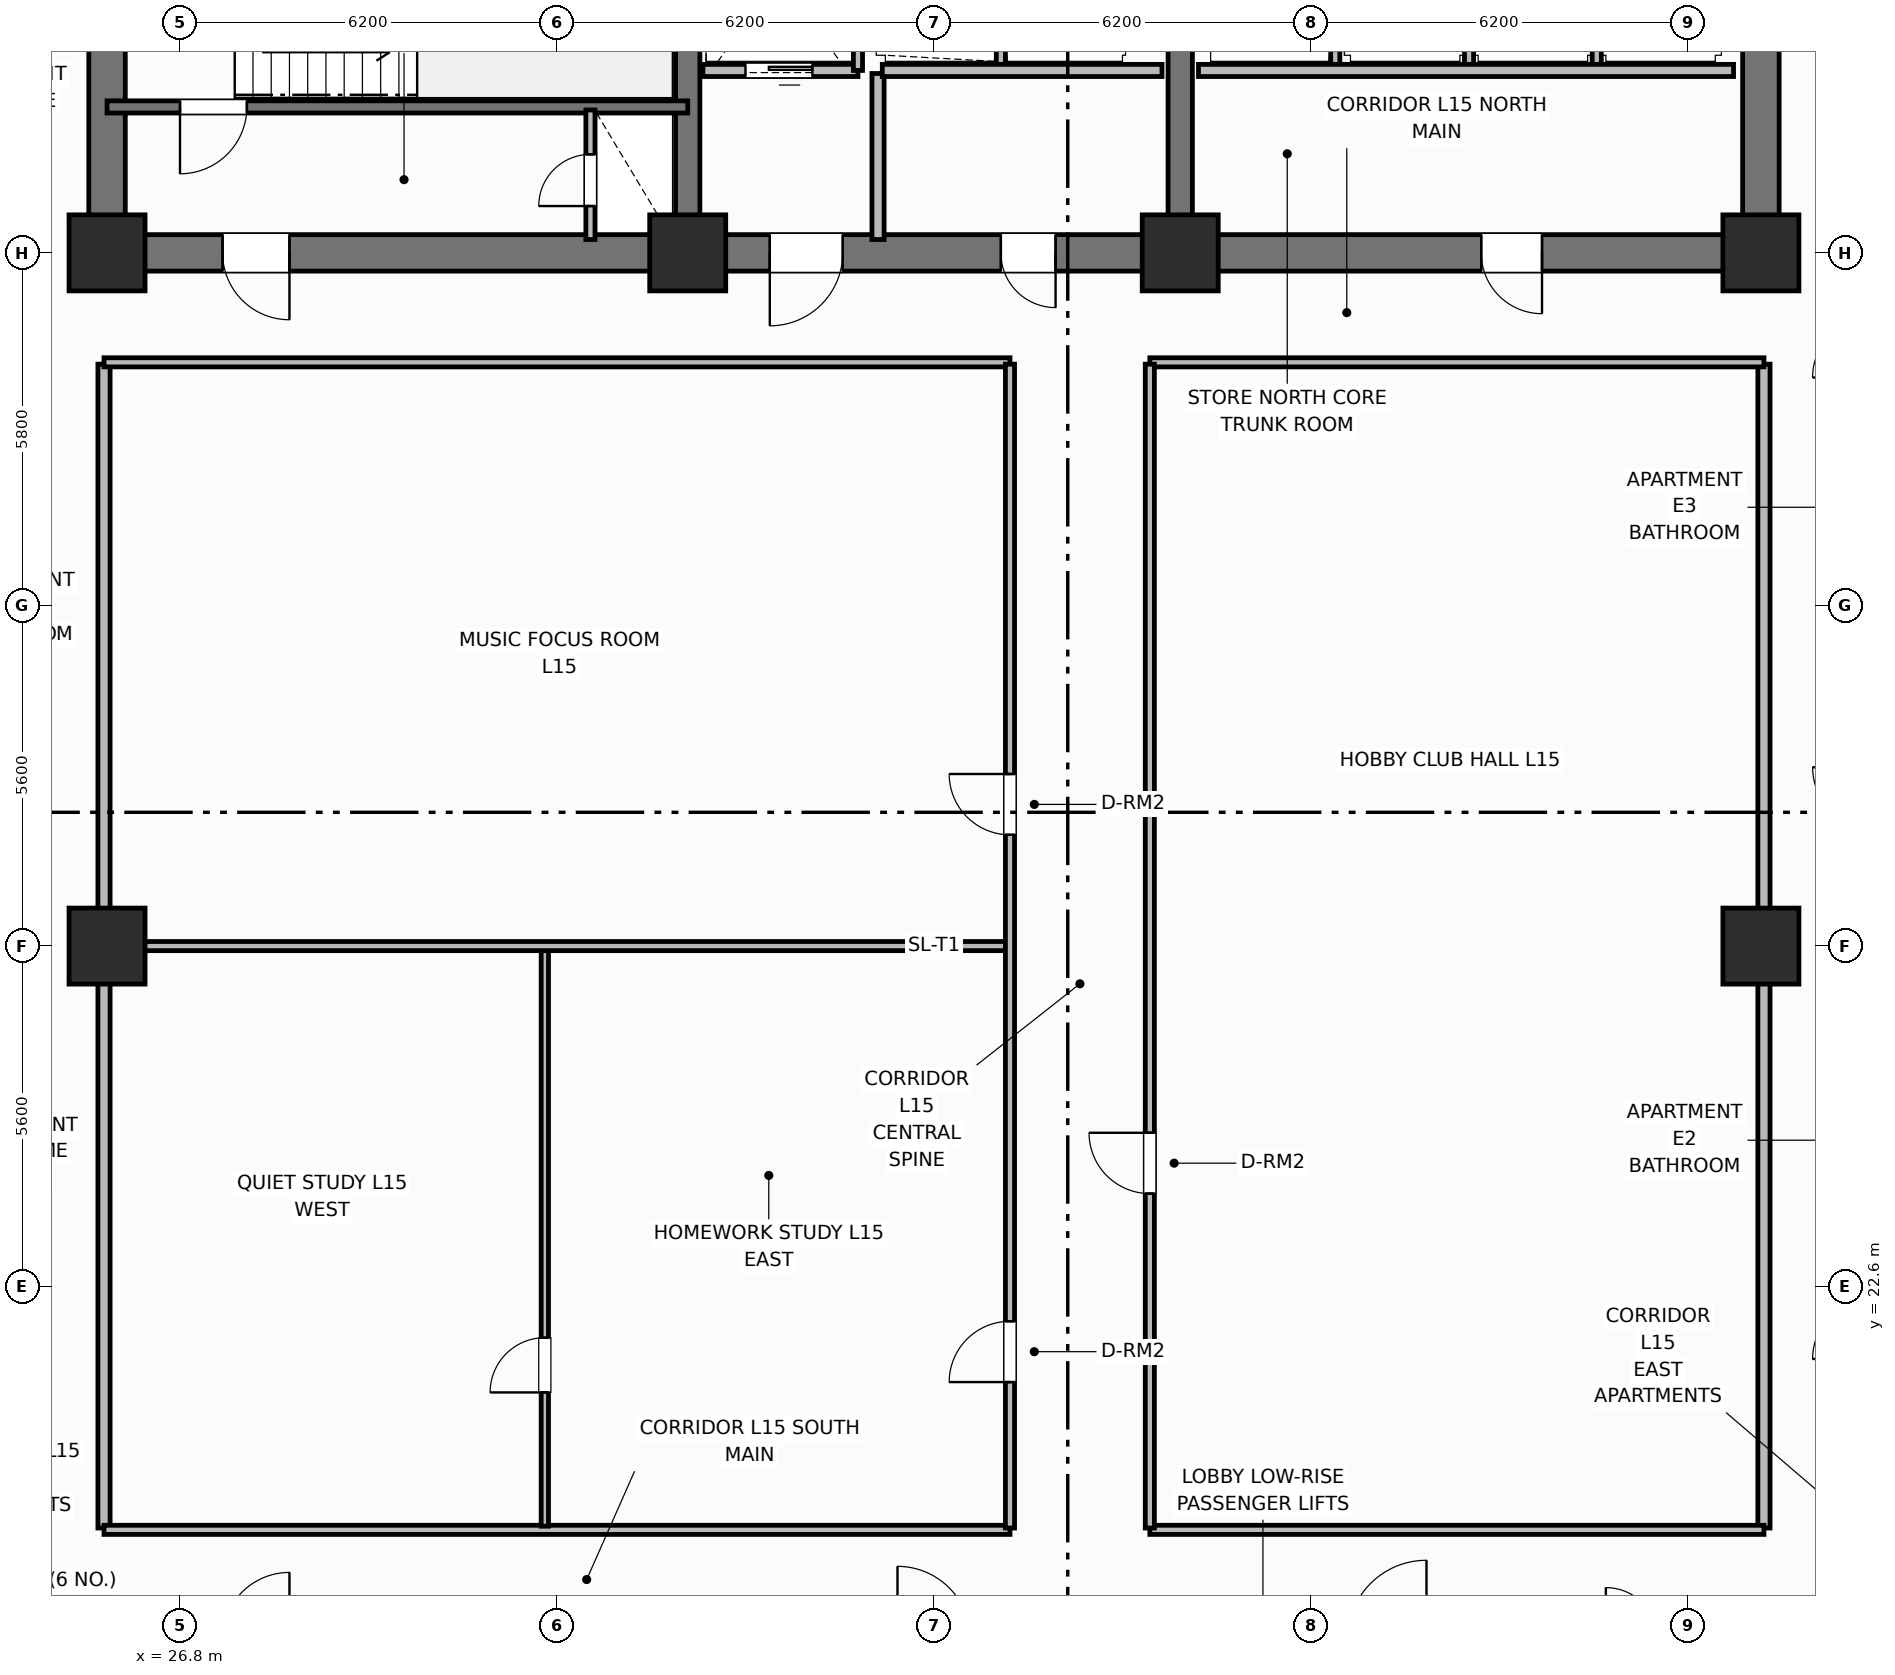
"""IFC4 building model, lengths in metres.
Left out: names, types, materials, properties, quantities, classifications, styles, units other than length and angle.
Written with IfcOpenShell. Run it as: python <this file> out.ifc"""

import sys

from ifc_helpers import new_model, si_unit, direction, frame, frame_2d, origin, origin_2d, place, context, subcontext, project, spatial, rectangle, extrude, element, fill, save


model = new_model("IFC4")
c1 = context("Model", 3, precision=1e-05, world=origin(), true_north=direction((0.0, 1.0)))
c2 = subcontext(c1, "Body", "Model", "MODEL_VIEW")
j1 = project(units=[si_unit("LENGTHUNIT", "METRE"), si_unit("PLANEANGLEUNIT", "RADIAN")], contexts=[c1])
p1 = place(None, origin())
s1 = spatial("IfcSite", under=j1, at=p1, CompositionType="ELEMENT")
p2 = place(p1, origin())
s2 = spatial("IfcBuilding", under=s1, at=p2, CompositionType="ELEMENT")
p3 = place(p2, frame((0.0, 0.0, 62.1)))
s3 = spatial("IfcBuildingStorey", under=s2, at=p3, CompositionType="ELEMENT", Elevation=62.1)
for number, where, z_axis, x_axis in (
    (1, (25.6, 39.9, 0.0), (0.0, 0.0, 1.0), (0.0, 1.0, 0.0)),
    (2, (52.8, 39.9, 0.0), (0.0, 0.0, 1.0), (0.0, 1.0, 0.0)),
):
    element("IfcWall", number, at=place(p3, frame(where, z_axis=z_axis, x_axis=x_axis)), inside=s3, PredefinedType="SHEAR", context=c2, shape_type="SweptSolid", body=[
        extrude(rectangle(XDim=5.6, YDim=0.6, at=frame_2d((2.8, 0.0))), origin(), (0.0, 0.0, 1.0), 3.7),
    ])
p4 = place(p3, frame((52.8, 39.6, 0.0), z_axis=(0.0, 0.0, 1.0), x_axis=(-1.0, 0.0, 0.0)))
e3 = element("IfcWall", 3, at=p4, inside=s3, PredefinedType="SHEAR", context=c2, shape_type="SweptSolid", body=[
    extrude(rectangle(XDim=27.2, YDim=0.6, at=frame_2d((13.6, 0.0))), origin(), (0.0, 0.0, 1.0), 3.7),
])
p5 = place(p4, frame((24.2, 0.0, 0.0)))
e4 = element("IfcOpeningElement", 4, at=p5, cuts=e3, PredefinedType="OPENING", context=c2, shape_type="SweptSolid", body=[
    extrude(rectangle(XDim=1.1, YDim=2.15, at=frame_2d((0.55, 1.075))), frame((0.0, 0.31, 0.0), z_axis=(0.0, -1.0, 0.0), x_axis=(1.0, 0.0, 0.0)), (0.0, 0.0, 1.0), 0.62),
])
p6 = place(p4, frame((15.1, 0.0, 0.0)))
e5 = element("IfcOpeningElement", 5, at=p6, cuts=e3, PredefinedType="OPENING", context=c2, shape_type="SweptSolid", body=[
    extrude(rectangle(XDim=1.2, YDim=2.15, at=frame_2d((0.6, 1.075))), frame((0.0, 0.31, 0.0), z_axis=(0.0, -1.0, 0.0), x_axis=(1.0, 0.0, 0.0)), (0.0, 0.0, 1.0), 0.62),
])
p7 = place(p4, frame((11.6, 0.0, 0.0)))
e6 = element("IfcOpeningElement", 6, at=p7, cuts=e3, PredefinedType="OPENING", context=c2, shape_type="SweptSolid", body=[
    extrude(rectangle(XDim=0.9, YDim=2.1, at=frame_2d((0.45, 1.05))), frame((0.0, 0.31, 0.0), z_axis=(0.0, -1.0, 0.0), x_axis=(1.0, 0.0, 0.0)), (0.0, 0.0, 1.0), 0.62),
])
p8 = place(p4, frame((3.6, 0.0, 0.0)))
e7 = element("IfcOpeningElement", 7, at=p8, cuts=e3, PredefinedType="OPENING", context=c2, shape_type="SweptSolid", body=[
    extrude(rectangle(XDim=1.0, YDim=2.15, at=frame_2d((0.5, 1.075))), frame((0.0, 0.31, 0.0), z_axis=(0.0, -1.0, 0.0), x_axis=(1.0, 0.0, 0.0)), (0.0, 0.0, 1.0), 0.62),
])
for number, where, z_axis, x_axis in (
    (8, (35.15, 39.9, 0.0), (0.0, 0.0, 1.0), (0.0, 1.0, 0.0)),
    (9, (43.25, 39.9, 0.0), (0.0, 0.0, 1.0), (0.0, 1.0, 0.0)),
):
    element("IfcWall", number, at=place(p3, frame(where, z_axis=z_axis, x_axis=x_axis)), inside=s3, PredefinedType="SHEAR", context=c2, shape_type="SweptSolid", body=[
        extrude(rectangle(XDim=5.6, YDim=0.4, at=frame_2d((2.8, 0.0))), origin(), (0.0, 0.0, 1.0), 3.7),
    ])
for number, where, z_axis, x_axis in (
    (10, (25.6, 39.6, 0.0), (0.0, 0.0, 1.0), (1.0, 0.0, 0.0)),
    (11, (35.15, 39.6, 0.0), (0.0, 0.0, 1.0), (1.0, 0.0, 0.0)),
    (12, (43.25, 39.6, 0.0), (0.0, 0.0, 1.0), (1.0, 0.0, 0.0)),
    (13, (52.8, 39.6, 0.0), (0.0, 0.0, 1.0), (1.0, 0.0, 0.0)),
    (14, (25.6, 28.2, 0.0), (0.0, 0.0, 1.0), (1.0, 0.0, 0.0)),
    (15, (52.8, 28.2, 0.0), (0.0, 0.0, 1.0), (1.0, 0.0, 0.0)),
):
    element("IfcColumn", number, at=place(p3, frame(where, z_axis=z_axis, x_axis=x_axis)), inside=s3, PredefinedType="COLUMN", context=c2, shape_type="SweptSolid", body=[
        extrude(rectangle(XDim=1.25, YDim=1.25, at=origin_2d()), origin(), (0.0, 0.0, 1.0), 3.7),
    ])
p9 = place(p3, frame((35.15, 42.0, 0.0), z_axis=(0.0, 0.0, 1.0), x_axis=(-1.0, 0.0, 0.0)))
e16 = element("IfcWall", 16, at=p9, inside=s3, PredefinedType="SHEAR", context=c2, shape_type="SweptSolid", body=[
    extrude(rectangle(XDim=9.55, YDim=0.2, at=frame_2d((4.775, 0.0))), origin(), (0.0, 0.0, 1.0), 3.7),
])
p10 = place(p9, frame((7.25, 0.0, 0.0)))
e17 = element("IfcOpeningElement", 17, at=p10, cuts=e16, PredefinedType="OPENING", context=c2, shape_type="SweptSolid", body=[
    extrude(rectangle(XDim=1.1, YDim=2.15, at=frame_2d((0.55, 1.075))), frame((0.0, 0.11, 0.0), z_axis=(0.0, -1.0, 0.0), x_axis=(1.0, 0.0, 0.0)), (0.0, 0.0, 1.0), 0.22),
])
p11 = place(p3, frame((33.55, 39.82, 0.0), z_axis=(0.0, 0.0, 1.0), x_axis=(0.0, 1.0, 0.0)))
e18 = element("IfcWall", 18, at=p11, inside=s3, PredefinedType="PARTITIONING", context=c2, shape_type="SweptSolid", body=[
    extrude(rectangle(XDim=2.13, YDim=0.15, at=frame_2d((1.065, 0.0))), origin(), (0.0, 0.0, 1.0), 2.53),
])
p12 = place(p11, frame((0.55, 0.0, 0.0)))
e19 = element("IfcOpeningElement", 19, at=p12, cuts=e18, PredefinedType="OPENING", context=c2, shape_type="SweptSolid", body=[
    extrude(rectangle(XDim=0.85, YDim=2.05, at=frame_2d((0.425, 1.025))), frame((0.0, 0.085, 0.0), z_axis=(0.0, -1.0, 0.0), x_axis=(1.0, 0.0, 0.0)), (0.0, 0.0, 1.0), 0.17),
])
p13 = place(p3, frame((37.95, 42.6, 0.0), z_axis=(0.0, 0.0, 1.0), x_axis=(-1.0, 0.0, 0.0)))
e20 = element("IfcWall", 20, at=p13, inside=s3, PredefinedType="PARTITIONING", context=c2, shape_type="SweptSolid", body=[
    extrude(rectangle(XDim=2.55, YDim=0.2, at=frame_2d((1.275, 0.0))), origin(), (0.0, 0.0, 1.0), 2.3),
])
p14 = place(p13, frame((0.75, 0.0, 0.0)))
e21 = element("IfcOpeningElement", 21, at=p14, cuts=e20, PredefinedType="OPENING", context=c2, shape_type="SweptSolid", body=[
    extrude(rectangle(XDim=1.1, YDim=2.15, at=frame_2d((0.55, 1.075))), frame((0.0, 0.11, 0.0), z_axis=(0.0, -1.0, 0.0), x_axis=(1.0, 0.0, 0.0)), (0.0, 0.0, 1.0), 0.22),
])
p15 = place(p3, frame((37.95, 42.6, 0.0), z_axis=(0.0, 0.0, 1.0), x_axis=(0.0, 1.0, 0.0)))
e22 = element("IfcWall", 22, at=p15, inside=s3, PredefinedType="PARTITIONING", context=c2, shape_type="SweptSolid", body=[
    extrude(rectangle(XDim=2.85, YDim=0.15, at=frame_2d((1.425, 0.0))), origin(), (0.0, 0.0, 1.0), 2.53),
])
p16 = place(p3, frame((38.28, 39.82, 0.0), z_axis=(0.0, 0.0, 1.0), x_axis=(0.0, 1.0, 0.0)))
e23 = element("IfcWall", 23, at=p16, inside=s3, PredefinedType="PARTITIONING", context=c2, shape_type="SweptSolid", body=[
    extrude(rectangle(XDim=2.73, YDim=0.2, at=frame_2d((1.365, 0.0))), origin(), (0.0, 0.0, 1.0), 2.53),
])
p17 = place(p3, frame((40.3, 42.65, 0.0), z_axis=(0.0, 0.0, 1.0), x_axis=(0.0, 1.0, 0.0)))
e24 = element("IfcWall", 24, at=p17, inside=s3, PredefinedType="PARTITIONING", context=c2, shape_type="SweptSolid", body=[
    extrude(rectangle(XDim=2.8, YDim=0.15, at=frame_2d((1.4, 0.0))), origin(), (0.0, 0.0, 1.0), 2.53),
])
p18 = place(p3, frame((42.95, 42.6, 0.0), z_axis=(0.0, 0.0, 1.0), x_axis=(-1.0, 0.0, 0.0)))
e25 = element("IfcWall", 25, at=p18, inside=s3, PredefinedType="PARTITIONING", context=c2, shape_type="SweptSolid", body=[
    extrude(rectangle(XDim=4.6, YDim=0.2, at=frame_2d((2.3, 0.0))), origin(), (0.0, 0.0, 1.0), 2.3),
])
for number, where, z_axis, x_axis in (
    (26, (45.8, 42.65, 0.0), (0.0, 0.0, 1.0), (0.0, 1.0, 0.0)),
    (27, (48.0, 42.65, 0.0), (0.0, 0.0, 1.0), (0.0, 1.0, 0.0)),
    (28, (50.1, 42.65, 0.0), (0.0, 0.0, 1.0), (0.0, 1.0, 0.0)),
):
    element("IfcWall", number, at=place(p3, frame(where, z_axis=z_axis, x_axis=x_axis)), inside=s3, PredefinedType="PARTITIONING", context=c2, shape_type="SweptSolid", body=[
        extrude(rectangle(XDim=2.8, YDim=0.15, at=frame_2d((1.4, 0.0))), origin(), (0.0, 0.0, 1.0), 2.53),
    ])
p19 = place(p3, frame((52.35, 42.6, 0.0), z_axis=(0.0, 0.0, 1.0), x_axis=(-1.0, 0.0, 0.0)))
e29 = element("IfcWall", 29, at=p19, inside=s3, PredefinedType="PARTITIONING", context=c2, shape_type="SweptSolid", body=[
    extrude(rectangle(XDim=8.8, YDim=0.2, at=frame_2d((4.4, 0.0))), origin(), (0.0, 0.0, 1.0), 2.53),
])
for number, where, z_axis, x_axis in (
    (30, (25.55, 18.63, 0.0), (0.0, 0.0, 1.0), (0.0, 1.0, 0.0)),
    (31, (52.85, 18.63, 0.0), (0.0, 0.0, 1.0), (0.0, 1.0, 0.0)),
):
    element("IfcWall", number, at=place(p3, frame(where, z_axis=z_axis, x_axis=x_axis)), inside=s3, PredefinedType="PARTITIONING", context=c2, shape_type="SweptSolid", body=[
        extrude(rectangle(XDim=19.14, YDim=0.2, at=frame_2d((9.57, 0.0))), origin(), (0.0, 0.0, 1.0), 2.53),
    ])
p20 = place(p3, frame((25.55, 18.6, 0.0), z_axis=(0.0, 0.0, 1.0), x_axis=(1.0, 0.0, 0.0)))
e32 = element("IfcWall", 32, at=p20, inside=s3, PredefinedType="PARTITIONING", context=c2, shape_type="SweptSolid", body=[
    extrude(rectangle(XDim=14.9, YDim=0.15, at=frame_2d((7.45, 0.0))), origin(), (0.0, 0.0, 1.0), 2.53),
])
p21 = place(p3, frame((42.75, 18.6, 0.0), z_axis=(0.0, 0.0, 1.0), x_axis=(1.0, 0.0, 0.0)))
e33 = element("IfcWall", 33, at=p21, inside=s3, PredefinedType="PARTITIONING", context=c2, shape_type="SweptSolid", body=[
    extrude(rectangle(XDim=10.1, YDim=0.15, at=frame_2d((5.05, 0.0))), origin(), (0.0, 0.0, 1.0), 2.53),
])
p22 = place(p3, frame((25.55, 37.8, 0.0), z_axis=(0.0, 0.0, 1.0), x_axis=(1.0, 0.0, 0.0)))
e34 = element("IfcWall", 34, at=p22, inside=s3, PredefinedType="PARTITIONING", context=c2, shape_type="SweptSolid", body=[
    extrude(rectangle(XDim=14.9, YDim=0.15, at=frame_2d((7.45, 0.0))), origin(), (0.0, 0.0, 1.0), 2.53),
])
p23 = place(p3, frame((42.75, 37.8, 0.0), z_axis=(0.0, 0.0, 1.0), x_axis=(1.0, 0.0, 0.0)))
e35 = element("IfcWall", 35, at=p23, inside=s3, PredefinedType="PARTITIONING", context=c2, shape_type="SweptSolid", body=[
    extrude(rectangle(XDim=10.1, YDim=0.15, at=frame_2d((5.05, 0.0))), origin(), (0.0, 0.0, 1.0), 2.53),
])
p24 = place(p3, frame((32.8, 18.66, 0.0), z_axis=(0.0, 0.0, 1.0), x_axis=(0.0, 1.0, 0.0)))
e36 = element("IfcWall", 36, at=p24, inside=s3, PredefinedType="PARTITIONING", context=c2, shape_type="SweptSolid", body=[
    extrude(rectangle(XDim=9.49, YDim=0.12, at=frame_2d((4.745, 0.0))), origin(), (0.0, 0.0, 1.0), 2.53),
])
p25 = place(p24, frame((2.2, 0.0, 0.0)))
e37 = element("IfcOpeningElement", 37, at=p25, cuts=e36, PredefinedType="OPENING", context=c2, shape_type="SweptSolid", body=[
    extrude(rectangle(XDim=0.9, YDim=2.1, at=frame_2d((0.45, 1.05))), frame((0.0, 0.07, 0.0), z_axis=(0.0, -1.0, 0.0), x_axis=(1.0, 0.0, 0.0)), (0.0, 0.0, 1.0), 0.14),
])
p26 = place(p3, frame((25.6, 28.2, 0.0), z_axis=(0.0, 0.0, 1.0), x_axis=(1.0, 0.0, 0.0)))
e38 = element("IfcWall", 38, at=p26, inside=s3, PredefinedType="PARTITIONING", context=c2, shape_type="SweptSolid", body=[
    extrude(rectangle(XDim=14.87, YDim=0.15, at=frame_2d((7.435, 0.0))), origin(), (0.0, 0.0, 1.0), 2.53),
])
p27 = place(p3, frame((40.45, 18.63, 0.0), z_axis=(0.0, 0.0, 1.0), x_axis=(0.0, 1.0, 0.0)))
e39 = element("IfcWall", 39, at=p27, inside=s3, PredefinedType="PARTITIONING", context=c2, shape_type="SweptSolid", body=[
    extrude(rectangle(XDim=19.14, YDim=0.15, at=frame_2d((9.57, 0.0))), origin(), (0.0, 0.0, 1.0), 2.53),
])
p28 = place(p27, frame((2.4, 0.0, 0.0)))
e40 = element("IfcOpeningElement", 40, at=p28, cuts=e39, PredefinedType="OPENING", context=c2, shape_type="SweptSolid", body=[
    extrude(rectangle(XDim=1.0, YDim=2.15, at=frame_2d((0.5, 1.075))), frame((0.0, 0.085, 0.0), z_axis=(0.0, -1.0, 0.0), x_axis=(1.0, 0.0, 0.0)), (0.0, 0.0, 1.0), 0.17),
])
p29 = place(p27, frame((11.4, 0.0, 0.0)))
e41 = element("IfcOpeningElement", 41, at=p29, cuts=e39, PredefinedType="OPENING", context=c2, shape_type="SweptSolid", body=[
    extrude(rectangle(XDim=1.0, YDim=2.15, at=frame_2d((0.5, 1.075))), frame((0.0, 0.085, 0.0), z_axis=(0.0, -1.0, 0.0), x_axis=(1.0, 0.0, 0.0)), (0.0, 0.0, 1.0), 0.17),
])
p30 = place(p3, frame((42.75, 18.63, 0.0), z_axis=(0.0, 0.0, 1.0), x_axis=(0.0, 1.0, 0.0)))
e42 = element("IfcWall", 42, at=p30, inside=s3, PredefinedType="PARTITIONING", context=c2, shape_type="SweptSolid", body=[
    extrude(rectangle(XDim=19.14, YDim=0.15, at=frame_2d((9.57, 0.0))), origin(), (0.0, 0.0, 1.0), 2.53),
])
p31 = place(p30, frame((5.5, 0.0, 0.0)))
e43 = element("IfcOpeningElement", 43, at=p31, cuts=e42, PredefinedType="OPENING", context=c2, shape_type="SweptSolid", body=[
    extrude(rectangle(XDim=1.0, YDim=2.15, at=frame_2d((0.5, 1.075))), frame((0.0, 0.085, 0.0), z_axis=(0.0, -1.0, 0.0), x_axis=(1.0, 0.0, 0.0)), (0.0, 0.0, 1.0), 0.17),
])
p32 = place(p10, origin())
e44 = element("IfcDoor", 44, at=p32, inside=s3, OperationType="SINGLE_SWING_RIGHT", PredefinedType="DOOR", context=c2, shape_type="SweptSolid", body=[
    extrude(rectangle(XDim=1.1, YDim=2.15, at=frame_2d((0.55, 1.075))), frame((0.0, 0.025, 0.0), z_axis=(0.0, -1.0, 0.0), x_axis=(1.0, 0.0, 0.0)), (0.0, 0.0, 1.0), 0.05),
])
fill(e17, e44)
p33 = place(p12, origin())
e45 = element("IfcDoor", 45, at=p33, inside=s3, OperationType="SINGLE_SWING_LEFT", PredefinedType="TRAPDOOR", context=c2, shape_type="SweptSolid", body=[
    extrude(rectangle(XDim=0.85, YDim=2.05, at=frame_2d((0.425, 1.025))), frame((0.0, 0.025, 0.0), z_axis=(0.0, -1.0, 0.0), x_axis=(1.0, 0.0, 0.0)), (0.0, 0.0, 1.0), 0.05),
])
fill(e19, e45)
p34 = place(p14, origin())
e46 = element("IfcDoor", 46, at=p34, inside=s3, OperationType="SLIDING_TO_LEFT", PredefinedType="DOOR", context=c2, shape_type="SweptSolid", body=[
    extrude(rectangle(XDim=1.1, YDim=2.15, at=frame_2d((0.55, 1.075))), frame((0.0, 0.025, 0.0), z_axis=(0.0, -1.0, 0.0), x_axis=(1.0, 0.0, 0.0)), (0.0, 0.0, 1.0), 0.05),
])
fill(e21, e46)
p35 = place(p25, origin())
e47 = element("IfcDoor", 47, at=p35, inside=s3, OperationType="SINGLE_SWING_LEFT", PredefinedType="DOOR", context=c2, shape_type="SweptSolid", body=[
    extrude(rectangle(XDim=0.9, YDim=2.1, at=frame_2d((0.45, 1.05))), frame((0.0, 0.025, 0.0), z_axis=(0.0, -1.0, 0.0), x_axis=(1.0, 0.0, 0.0)), (0.0, 0.0, 1.0), 0.05),
])
fill(e37, e47)
p36 = place(p28, origin())
e48 = element("IfcDoor", 48, at=p36, inside=s3, OperationType="SINGLE_SWING_LEFT", PredefinedType="DOOR", context=c2, shape_type="SweptSolid", body=[
    extrude(rectangle(XDim=1.0, YDim=2.15, at=frame_2d((0.5, 1.075))), frame((0.0, 0.025, 0.0), z_axis=(0.0, -1.0, 0.0), x_axis=(1.0, 0.0, 0.0)), (0.0, 0.0, 1.0), 0.05),
])
fill(e40, e48)
p37 = place(p29, origin())
e49 = element("IfcDoor", 49, at=p37, inside=s3, OperationType="SINGLE_SWING_RIGHT", PredefinedType="DOOR", context=c2, shape_type="SweptSolid", body=[
    extrude(rectangle(XDim=1.0, YDim=2.15, at=frame_2d((0.5, 1.075))), frame((0.0, 0.025, 0.0), z_axis=(0.0, -1.0, 0.0), x_axis=(1.0, 0.0, 0.0)), (0.0, 0.0, 1.0), 0.05),
])
fill(e41, e49)
p38 = place(p31, origin())
e50 = element("IfcDoor", 50, at=p38, inside=s3, OperationType="SINGLE_SWING_RIGHT", PredefinedType="DOOR", context=c2, shape_type="SweptSolid", body=[
    extrude(rectangle(XDim=1.0, YDim=2.15, at=frame_2d((0.5, 1.075))), frame((0.0, 0.025, 0.0), z_axis=(0.0, -1.0, 0.0), x_axis=(1.0, 0.0, 0.0)), (0.0, 0.0, 1.0), 0.05),
])
fill(e43, e50)
p39 = place(p5, origin())
e51 = element("IfcDoor", 51, at=p39, inside=s3, OperationType="SINGLE_SWING_LEFT", PredefinedType="DOOR", context=c2, shape_type="SweptSolid", body=[
    extrude(rectangle(XDim=1.1, YDim=2.15, at=frame_2d((0.55, 1.075))), frame((0.0, 0.025, 0.0), z_axis=(0.0, -1.0, 0.0), x_axis=(1.0, 0.0, 0.0)), (0.0, 0.0, 1.0), 0.05),
])
fill(e4, e51)
p40 = place(p6, origin())
e52 = element("IfcDoor", 52, at=p40, inside=s3, OperationType="SINGLE_SWING_RIGHT", PredefinedType="DOOR", context=c2, shape_type="SweptSolid", body=[
    extrude(rectangle(XDim=1.2, YDim=2.15, at=frame_2d((0.6, 1.075))), frame((0.0, 0.025, 0.0), z_axis=(0.0, -1.0, 0.0), x_axis=(1.0, 0.0, 0.0)), (0.0, 0.0, 1.0), 0.05),
])
fill(e5, e52)
p41 = place(p7, origin())
e53 = element("IfcDoor", 53, at=p41, inside=s3, OperationType="SINGLE_SWING_LEFT", PredefinedType="DOOR", context=c2, shape_type="SweptSolid", body=[
    extrude(rectangle(XDim=0.9, YDim=2.1, at=frame_2d((0.45, 1.05))), frame((0.0, 0.025, 0.0), z_axis=(0.0, -1.0, 0.0), x_axis=(1.0, 0.0, 0.0)), (0.0, 0.0, 1.0), 0.05),
])
fill(e6, e53)
p42 = place(p8, origin())
e54 = element("IfcDoor", 54, at=p42, inside=s3, OperationType="SINGLE_SWING_LEFT", PredefinedType="DOOR", context=c2, shape_type="SweptSolid", body=[
    extrude(rectangle(XDim=1.0, YDim=2.15, at=frame_2d((0.5, 1.075))), frame((0.0, 0.025, 0.0), z_axis=(0.0, -1.0, 0.0), x_axis=(1.0, 0.0, 0.0)), (0.0, 0.0, 1.0), 0.05),
])
fill(e7, e54)
save(model, sys.argv[1])
